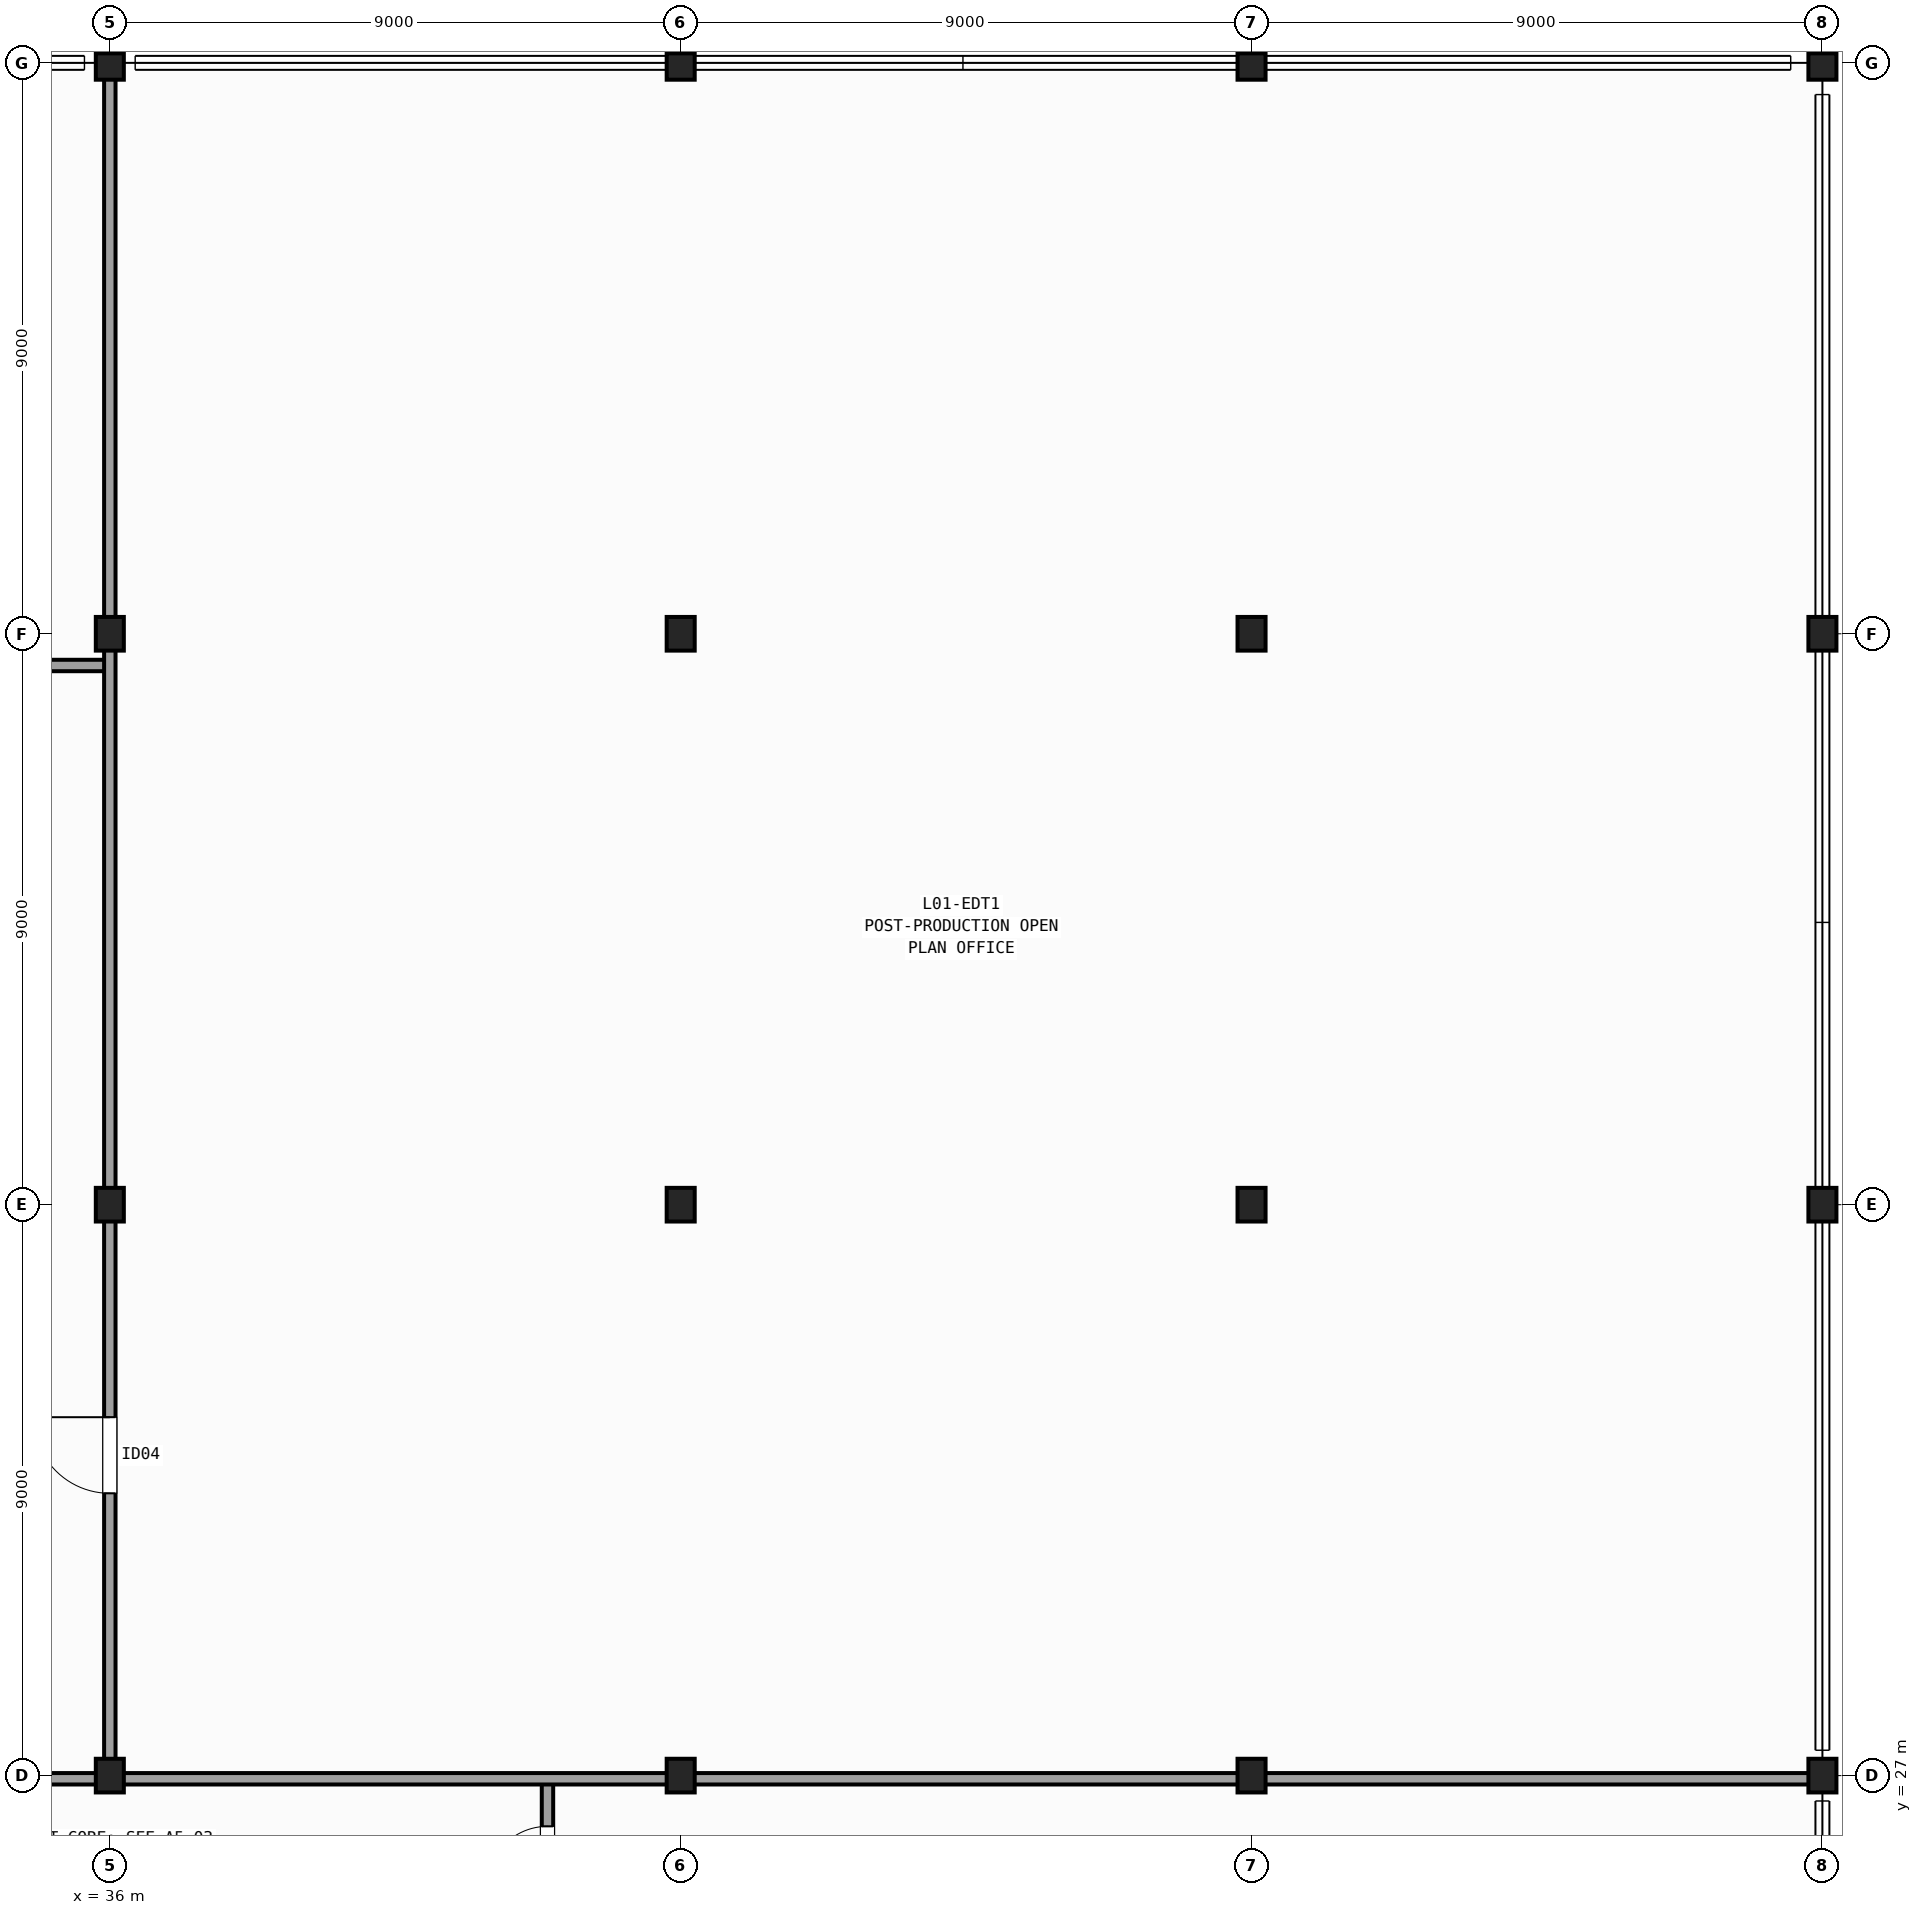
"""IFC4 building model, lengths in metres.
Left out: names, types, materials, properties, quantities, classifications, styles, units other than length and angle.
Written with IfcOpenShell. Run it as: python <this file> out.ifc"""

import sys

from ifc_helpers import new_model, si_unit, direction, frame, frame_2d, origin, origin_2d, place, context, subcontext, project, spatial, rectangle, i_section, extrude, element, fill, save


model = new_model("IFC4")
c1 = context("Model", 3, precision=1e-05, world=origin(), true_north=direction((0.0, 1.0)))
c2 = subcontext(c1, "Body", "Model", "MODEL_VIEW")
j1 = project(units=[si_unit("LENGTHUNIT", "METRE"), si_unit("PLANEANGLEUNIT", "RADIAN")], contexts=[c1])
p1 = place(None, origin())
s1 = spatial("IfcSite", under=j1, at=p1, CompositionType="ELEMENT")
p2 = place(p1, origin())
s2 = spatial("IfcBuilding", under=s1, at=p2, CompositionType="ELEMENT")
p3 = place(p2, frame((0.0, 0.0, 5.8)))
s3 = spatial("IfcBuildingStorey", under=s2, at=p3, CompositionType="ELEMENT", Elevation=5.8)
for number, where, z_axis, x_axis in (
    (1, (36.0, 27.0, 0.0), (0.0, 0.0, 1.0), (1.0, 0.0, 0.0)),
    (2, (36.0, 36.0, 0.0), (0.0, 0.0, 1.0), (1.0, 0.0, 0.0)),
    (3, (36.0, 45.0, 0.0), (0.0, 0.0, 1.0), (1.0, 0.0, 0.0)),
    (4, (36.0, 54.0, 0.0), (0.0, 0.0, 1.0), (1.0, 0.0, 0.0)),
    (5, (45.0, 27.0, 0.0), (0.0, 0.0, 1.0), (1.0, 0.0, 0.0)),
    (6, (45.0, 36.0, 0.0), (0.0, 0.0, 1.0), (1.0, 0.0, 0.0)),
    (7, (45.0, 45.0, 0.0), (0.0, 0.0, 1.0), (1.0, 0.0, 0.0)),
    (8, (45.0, 54.0, 0.0), (0.0, 0.0, 1.0), (1.0, 0.0, 0.0)),
    (9, (54.0, 27.0, 0.0), (0.0, 0.0, 1.0), (1.0, 0.0, 0.0)),
    (10, (54.0, 36.0, 0.0), (0.0, 0.0, 1.0), (1.0, 0.0, 0.0)),
    (11, (54.0, 45.0, 0.0), (0.0, 0.0, 1.0), (1.0, 0.0, 0.0)),
    (12, (54.0, 54.0, 0.0), (0.0, 0.0, 1.0), (1.0, 0.0, 0.0)),
    (13, (63.0, 27.0, 0.0), (0.0, 0.0, 1.0), (1.0, 0.0, 0.0)),
    (14, (63.0, 36.0, 0.0), (0.0, 0.0, 1.0), (1.0, 0.0, 0.0)),
    (15, (63.0, 45.0, 0.0), (0.0, 0.0, 1.0), (1.0, 0.0, 0.0)),
    (16, (63.0, 54.0, 0.0), (0.0, 0.0, 1.0), (1.0, 0.0, 0.0)),
):
    element("IfcColumn", number, at=place(p3, frame(where, z_axis=z_axis, x_axis=x_axis)), inside=s3, PredefinedType="COLUMN", context=c2, shape_type="SweptSolid", body=[
        extrude(i_section(OverallWidth=0.442, OverallDepth=0.531, WebThickness=0.066, FlangeThickness=0.106, FilletRadius=0.015, at=origin_2d()), origin(), (0.0, 0.0, 1.0), 5.2),
    ])
p4 = place(p3, frame((42.9, 24.6, 0.0), z_axis=(0.0, 0.0, 1.0), x_axis=(0.0, 1.0, 0.0)))
e17 = element("IfcWall", 17, at=p4, inside=s3, PredefinedType="PARTITIONING", context=c2, shape_type="SweptSolid", body=[
    extrude(rectangle(XDim=2.35, YDim=0.18, at=frame_2d((1.175, 0.0))), origin(), (0.0, 0.0, 1.0), 3.933),
])
p5 = place(p4, frame((0.65, 0.0, 0.0)))
e18 = element("IfcOpeningElement", 18, at=p5, cuts=e17, PredefinedType="OPENING", context=c2, shape_type="SweptSolid", body=[
    extrude(rectangle(XDim=0.95, YDim=2.1, at=frame_2d((0.475, 1.05))), frame((0.0, 0.1, 0.0), z_axis=(0.0, -1.0, 0.0), x_axis=(1.0, 0.0, 0.0)), (0.0, 0.0, 1.0), 0.2),
])
p6 = place(p3, frame((27.1, 26.95, 0.0), z_axis=(0.0, 0.0, 1.0), x_axis=(1.0, 0.0, 0.0)))
e19 = element("IfcWall", 19, at=p6, inside=s3, PredefinedType="PARTITIONING", context=c2, shape_type="SweptSolid", body=[
    extrude(rectangle(XDim=35.9, YDim=0.18, at=frame_2d((17.95, 0.0))), origin(), (0.0, 0.0, 1.0), 3.933),
])
p7 = place(p3, frame((11.1, 44.5, 0.0), z_axis=(0.0, 0.0, 1.0), x_axis=(1.0, 0.0, 0.0)))
e20 = element("IfcWall", 20, at=p7, inside=s3, PredefinedType="PARTITIONING", context=c2, shape_type="SweptSolid", body=[
    extrude(rectangle(XDim=24.9, YDim=0.18, at=frame_2d((12.45, 0.0))), origin(), (0.0, 0.0, 1.0), 4.005),
])
p8 = place(p7, frame((4.5, 0.0, 0.0)))
e21 = element("IfcOpeningElement", 21, at=p8, cuts=e20, PredefinedType="OPENING", context=c2, shape_type="SweptSolid", body=[
    extrude(rectangle(XDim=1.05, YDim=2.15, at=frame_2d((0.525, 1.075))), frame((0.0, 0.1, 0.0), z_axis=(0.0, -1.0, 0.0), x_axis=(1.0, 0.0, 0.0)), (0.0, 0.0, 1.0), 0.2),
])
p9 = place(p3, frame((36.0, 26.95, 0.0), z_axis=(0.0, 0.0, 1.0), x_axis=(0.0, 1.0, 0.0)))
e22 = element("IfcWall", 22, at=p9, inside=s3, PredefinedType="PARTITIONING", context=c2, shape_type="SweptSolid", body=[
    extrude(rectangle(XDim=27.05, YDim=0.18, at=frame_2d((13.525, 0.0))), origin(), (0.0, 0.0, 1.0), 3.933),
])
p10 = place(p9, frame((4.5, 0.0, 0.0)))
e23 = element("IfcOpeningElement", 23, at=p10, cuts=e22, PredefinedType="OPENING", context=c2, shape_type="SweptSolid", body=[
    extrude(rectangle(XDim=1.2, YDim=2.15, at=frame_2d((0.6, 1.075))), frame((0.0, 0.1, 0.0), z_axis=(0.0, -1.0, 0.0), x_axis=(1.0, 0.0, 0.0)), (0.0, 0.0, 1.0), 0.2),
])
p11 = place(p5, origin())
e24 = element("IfcDoor", 24, at=p11, inside=s3, OperationType="SINGLE_SWING_LEFT", PredefinedType="DOOR", context=c2, shape_type="SweptSolid", body=[
    extrude(rectangle(XDim=0.95, YDim=2.1, at=frame_2d((0.475, 1.05))), frame((0.0, 0.025, 0.0), z_axis=(0.0, -1.0, 0.0), x_axis=(1.0, 0.0, 0.0)), (0.0, 0.0, 1.0), 0.05),
])
fill(e18, e24)
p12 = place(p10, origin())
e25 = element("IfcDoor", 25, at=p12, inside=s3, OperationType="SINGLE_SWING_RIGHT", PredefinedType="DOOR", context=c2, shape_type="SweptSolid", body=[
    extrude(rectangle(XDim=1.2, YDim=2.15, at=frame_2d((0.6, 1.075))), frame((0.0, 0.025, 0.0), z_axis=(0.0, -1.0, 0.0), x_axis=(1.0, 0.0, 0.0)), (0.0, 0.0, 1.0), 0.05),
])
fill(e23, e25)
save(model, sys.argv[1])
